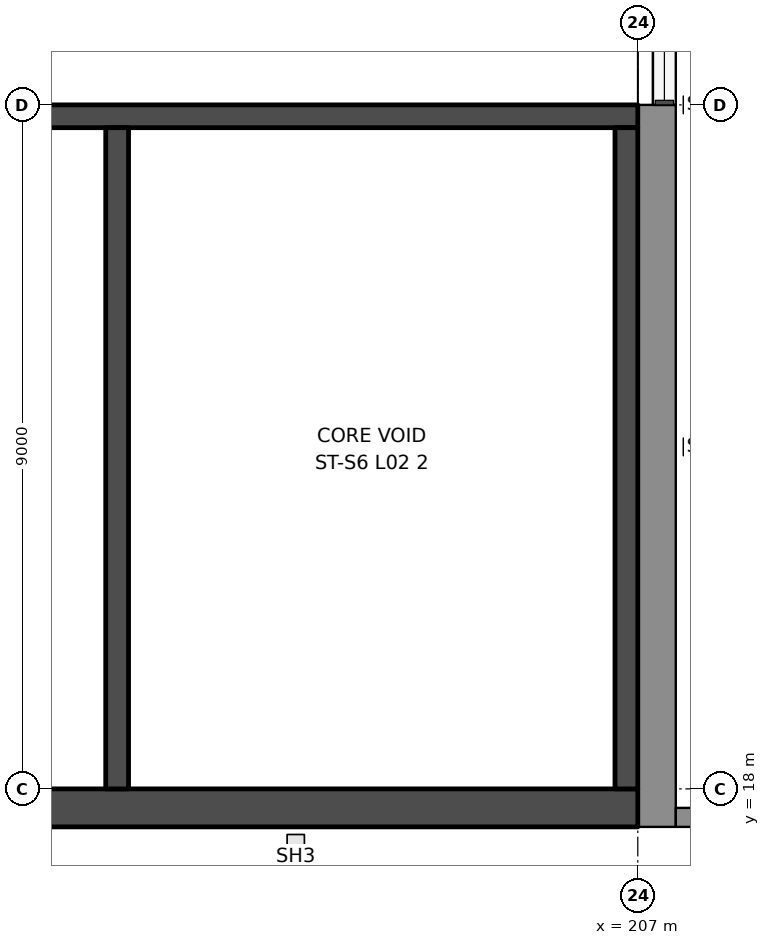
"""IFC4 building model, lengths in metres.
Left out: names, types, materials, properties, quantities, classifications, styles, units other than length and angle.
Written with IfcOpenShell. Run it as: python <this file> out.ifc"""

import sys

from ifc_helpers import new_model, si_unit, direction, frame, frame_2d, origin, place, context, subcontext, project, spatial, rectangle, extrude, element, save


model = new_model("IFC4")
c1 = context("Model", 3, precision=1e-05, world=origin(), true_north=direction((0.0, 1.0)))
c2 = subcontext(c1, "Body", "Model", "MODEL_VIEW")
j1 = project(units=[si_unit("LENGTHUNIT", "METRE"), si_unit("PLANEANGLEUNIT", "RADIAN")], contexts=[c1])
p1 = place(None, origin())
s1 = spatial("IfcSite", under=j1, at=p1, CompositionType="ELEMENT")
p2 = place(p1, origin())
s2 = spatial("IfcBuilding", under=s1, at=p2, CompositionType="ELEMENT")
p3 = place(p2, frame((0.0, 0.0, 11.5)))
s3 = spatial("IfcBuildingStorey", under=s2, at=p3, CompositionType="ELEMENT", Elevation=11.5)
p4 = place(p3, frame((207.25, 17.5, 0.0), z_axis=(0.0, 0.0, 1.0), x_axis=(0.0, 1.0, 0.0)))
e1 = element("IfcWall", 1, at=p4, inside=s3, PredefinedType="SOLIDWALL", context=c2, shape_type="SweptSolid", body=[
    extrude(rectangle(XDim=9.5, YDim=0.5, at=frame_2d((4.75, 0.0))), origin(), (0.0, 0.0, 1.0), 10.5),
])
p5 = place(p3, frame((207.35, 27.0, 0.0), z_axis=(0.0, 0.0, 1.0), x_axis=(0.0, 1.0, 0.0)))
e2 = element("IfcWall", 2, at=p5, inside=s3, PredefinedType="SOLIDWALL", context=c2, shape_type="SweptSolid", body=[
    extrude(rectangle(XDim=8.55, YDim=0.3, at=frame_2d((4.275, 0.0))), origin(), (0.0, 0.0, 1.0), 1.0),
])
p6 = place(p3, frame((207.5, 17.625, 0.0), z_axis=(0.0, 0.0, 1.0), x_axis=(1.0, 0.0, 0.0)))
e3 = element("IfcWall", 3, at=p6, inside=s3, PredefinedType="PARAPET", context=c2, shape_type="SweptSolid", body=[
    extrude(rectangle(XDim=13.5, YDim=0.25, at=frame_2d((6.75, 0.0))), origin(), (0.0, 0.0, 1.0), 1.2),
])
p7 = place(p3, frame((189.0, 26.85, 0.0), z_axis=(0.0, 0.0, 1.0), x_axis=(1.0, 0.0, 0.0)))
e4 = element("IfcWall", 4, at=p7, inside=s3, PredefinedType="SHEAR", context=c2, shape_type="SweptSolid", body=[
    extrude(rectangle(XDim=18.0, YDim=0.3, at=frame_2d((9.0, 0.0))), origin(), (0.0, 0.0, 1.0), 10.5),
])
p8 = place(p7, frame((8.6, 0.0, 0.0)))
e5 = element("IfcOpeningElement", 5, at=p8, cuts=e4, PredefinedType="OPENING", context=c2, shape_type="SweptSolid", body=[
    extrude(rectangle(XDim=1.2, YDim=2.1, at=frame_2d((0.6, 1.05))), frame((0.0, 0.16, 0.0), z_axis=(0.0, -1.0, 0.0), x_axis=(1.0, 0.0, 0.0)), (0.0, 0.0, 1.0), 0.32),
])
p9 = place(p3, frame((189.0, 17.75, 0.0), z_axis=(0.0, 0.0, 1.0), x_axis=(1.0, 0.0, 0.0)))
e6 = element("IfcWall", 6, at=p9, inside=s3, PredefinedType="SHEAR", context=c2, shape_type="SweptSolid", body=[
    extrude(rectangle(XDim=18.0, YDim=0.5, at=frame_2d((9.0, 0.0))), origin(), (0.0, 0.0, 1.0), 10.5),
])
for number, where, z_axis, x_axis in (
    (7, (206.85, 26.7, 0.0), (0.0, 0.0, 1.0), (0.0, -1.0, 0.0)),
    (8, (200.15, 26.7, 0.0), (0.0, 0.0, 1.0), (0.0, -1.0, 0.0)),
):
    element("IfcWall", number, at=place(p3, frame(where, z_axis=z_axis, x_axis=x_axis)), inside=s3, PredefinedType="SHEAR", context=c2, shape_type="SweptSolid", body=[
        extrude(rectangle(XDim=8.7, YDim=0.3, at=frame_2d((4.35, 0.0))), origin(), (0.0, 0.0, 1.0), 10.5),
    ])
save(model, sys.argv[1])
